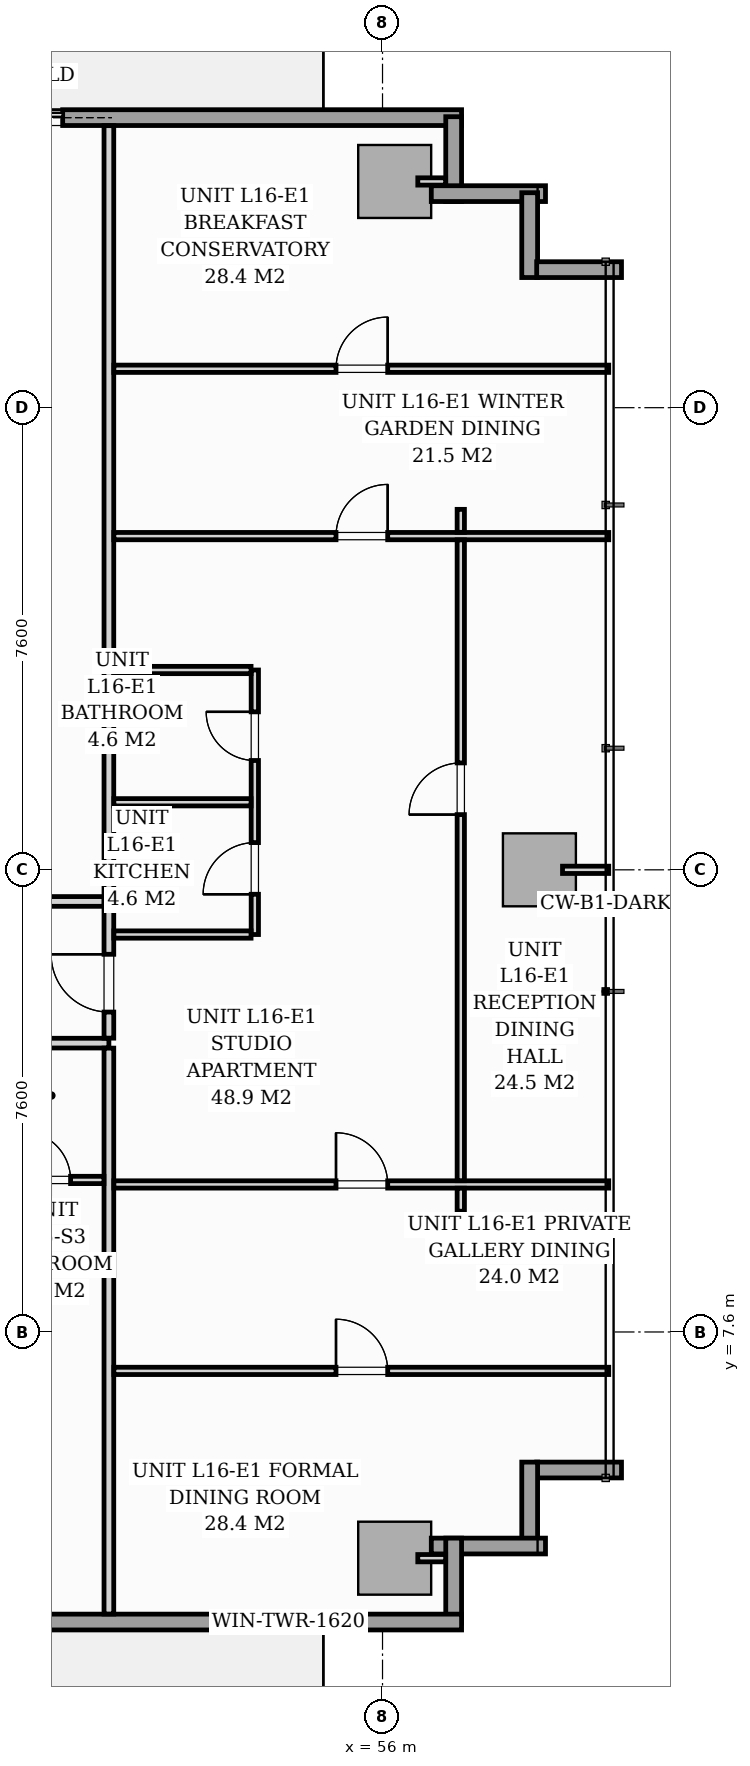
"""IFC4 building model, lengths in metres.
Left out: names, types, materials, properties, quantities, classifications, styles, units other than length and angle.
Written with IfcOpenShell. Run it as: python <this file> out.ifc"""

import sys

from ifc_helpers import new_model, si_unit, direction, frame, frame_2d, origin, origin_2d, place, context, subcontext, project, spatial, rectangle, extrude, source, transform, mapped, element, fill, save


model = new_model("IFC4")
c1 = context("Model", 3, precision=1e-05, world=origin(), true_north=direction((0.0, 1.0)))
c2 = subcontext(c1, "Body", "Model", "MODEL_VIEW")
j1 = project(units=[si_unit("LENGTHUNIT", "METRE"), si_unit("PLANEANGLEUNIT", "RADIAN")], contexts=[c1])
p1 = place(None, origin())
s1 = spatial("IfcSite", under=j1, at=p1, CompositionType="ELEMENT")
p2 = place(p1, origin())
s2 = spatial("IfcBuilding", under=s1, at=p2, CompositionType="ELEMENT")
p3 = place(p2, frame((0.0, 0.0, 58.2)))
s3 = spatial("IfcBuildingStorey", under=s2, at=p3, CompositionType="ELEMENT", Elevation=58.2)
m1 = source(origin(), c2, "Body", "SweptSolid", [
    extrude(rectangle(XDim=1.2, YDim=1.2, at=origin_2d()), origin(), (0.0, 0.0, 1.0), 3.196),
])
for number, where, z_axis, x_axis in (
    (1, (56.2, 3.88, 0.002), (0.0, 0.0, 1.0), (1.0, 0.0, 0.0)),
    (2, (56.2, 26.52, 0.002), (0.0, 0.0, 1.0), (1.0, 0.0, 0.0)),
    (3, (58.58, 15.2, 0.002), (0.0, 0.0, 1.0), (1.0, 0.0, 0.0)),
):
    element("IfcColumn", number, at=place(p3, frame(where, z_axis=z_axis, x_axis=x_axis)), inside=s3, PredefinedType="COLUMN", context=c2, shape_type="MappedRepresentation", body=[
        mapped(m1, transform((0.0, 0.0, 0.0), scale=1.0)),
    ])
p4 = place(p3, frame((40.15, 27.57, 0.0), z_axis=(0.0, 0.0, 1.0), x_axis=(1.0, 0.0, 0.0)))
e4 = element("IfcWall", 4, at=p4, inside=s3, PredefinedType="STANDARD", context=c2, shape_type="SweptSolid", body=[
    extrude(rectangle(XDim=17.15, YDim=0.26, at=frame_2d((8.575, 0.0))), origin(), (0.0, 0.0, 1.0), 2.94),
])
p5 = place(p4, frame((8.79, 0.0, 0.0)))
e5 = element("IfcOpeningElement", 5, at=p5, cuts=e4, PredefinedType="OPENING", context=c2, shape_type="SweptSolid", body=[
    extrude(rectangle(XDim=1.8, YDim=2.06, at=frame_2d((0.9, 1.03))), frame((0.0, 0.14, 0.0), z_axis=(0.0, -1.0, 0.0), x_axis=(1.0, 0.0, 0.0)), (0.0, 0.0, 1.0), 0.28),
])
p6 = place(p4, frame((0.7, 0.0, 0.65)))
e6 = element("IfcOpeningElement", 6, at=p6, cuts=e4, PredefinedType="OPENING", context=c2, shape_type="SweptSolid", body=[
    extrude(rectangle(XDim=1.6, YDim=1.5, at=frame_2d((0.8, 0.75))), frame((0.0, 0.14, 0.0), z_axis=(0.0, -1.0, 0.0), x_axis=(1.0, 0.0, 0.0)), (0.0, 0.0, 1.0), 0.28),
])
p7 = place(p3, frame((57.17, 27.585, 0.0), z_axis=(0.0, 0.0, 1.0), x_axis=(0.0, -1.0, 0.0)))
e7 = element("IfcWall", 7, at=p7, inside=s3, PredefinedType="STANDARD", context=c2, shape_type="SweptSolid", body=[
    extrude(rectangle(XDim=1.395, YDim=0.26, at=frame_2d((0.698, 0.0))), origin(), (0.0, 0.0, 1.0), 2.94),
])
p8 = place(p3, frame((56.802, 26.32, 0.0), z_axis=(0.0, 0.0, 1.0), x_axis=(1.0, 0.0, 0.0)))
e8 = element("IfcWall", 8, at=p8, inside=s3, PredefinedType="STANDARD", context=c2, shape_type="SweptSolid", body=[
    extrude(rectangle(XDim=1.878, YDim=0.26, at=frame_2d((0.939, 0.0))), origin(), (0.0, 0.0, 1.0), 2.94),
])
for number, where, z_axis, x_axis in (
    (9, (58.42, 26.335, 0.0), (0.0, 0.0, 1.0), (0.0, -1.0, 0.0)),
    (10, (58.535, 25.07, 0.0), (0.0, 0.0, 1.0), (1.0, 0.0, 0.0)),
    (11, (59.93, 5.33, 0.0), (0.0, 0.0, 1.0), (-1.0, 0.0, 0.0)),
    (12, (58.42, 5.46, 0.0), (0.0, 0.0, 1.0), (0.0, -1.0, 0.0)),
):
    element("IfcWall", number, at=place(p3, frame(where, z_axis=z_axis, x_axis=x_axis)), inside=s3, PredefinedType="STANDARD", context=c2, shape_type="SweptSolid", body=[
        extrude(rectangle(XDim=1.395, YDim=0.26, at=frame_2d((0.698, 0.0))), origin(), (0.0, 0.0, 1.0), 2.94),
    ])
p9 = place(p3, frame((58.68, 4.08, 0.0), z_axis=(0.0, 0.0, 1.0), x_axis=(-1.0, 0.0, 0.0)))
e13 = element("IfcWall", 13, at=p9, inside=s3, PredefinedType="STANDARD", context=c2, shape_type="SweptSolid", body=[
    extrude(rectangle(XDim=1.878, YDim=0.26, at=frame_2d((0.939, 0.0))), origin(), (0.0, 0.0, 1.0), 2.94),
])
p10 = place(p3, frame((57.17, 4.21, 0.0), z_axis=(0.0, 0.0, 1.0), x_axis=(0.0, -1.0, 0.0)))
e14 = element("IfcWall", 14, at=p10, inside=s3, PredefinedType="STANDARD", context=c2, shape_type="SweptSolid", body=[
    extrude(rectangle(XDim=1.395, YDim=0.26, at=frame_2d((0.698, 0.0))), origin(), (0.0, 0.0, 1.0), 2.94),
])
p11 = place(p3, frame((57.3, 2.83, 0.0), z_axis=(0.0, 0.0, 1.0), x_axis=(-1.0, 0.0, 0.0)))
e15 = element("IfcWall", 15, at=p11, inside=s3, PredefinedType="STANDARD", context=c2, shape_type="SweptSolid", body=[
    extrude(rectangle(XDim=17.15, YDim=0.26, at=frame_2d((8.575, 0.0))), origin(), (0.0, 0.0, 1.0), 2.94),
])
p12 = place(p11, frame((8.633, 0.0, 0.0)))
e16 = element("IfcOpeningElement", 16, at=p12, cuts=e15, PredefinedType="OPENING", context=c2, shape_type="SweptSolid", body=[
    extrude(rectangle(XDim=1.8, YDim=2.06, at=frame_2d((0.9, 1.03))), frame((0.0, 0.14, 0.0), z_axis=(0.0, -1.0, 0.0), x_axis=(1.0, 0.0, 0.0)), (0.0, 0.0, 1.0), 0.28),
])
p13 = place(p11, frame((2.05, 0.0, 0.65)))
e17 = element("IfcOpeningElement", 17, at=p13, cuts=e15, PredefinedType="OPENING", context=c2, shape_type="SweptSolid", body=[
    extrude(rectangle(XDim=1.6, YDim=1.5, at=frame_2d((0.8, 0.75))), frame((0.0, 0.14, 0.0), z_axis=(0.0, -1.0, 0.0), x_axis=(1.0, 0.0, 0.0)), (0.0, 0.0, 1.0), 0.28),
])
p14 = place(p3, frame((16.3, 12.35, 0.0), z_axis=(0.0, 0.0, 1.0), x_axis=(1.0, 0.0, 0.0)))
e18 = element("IfcWall", 18, at=p14, inside=s3, PredefinedType="PARTITIONING", context=c2, shape_type="SweptSolid", body=[
    extrude(rectangle(XDim=35.2, YDim=0.16, at=frame_2d((17.6, 0.0))), origin(), (0.0, 0.0, 1.0), 2.94),
])
p15 = place(p14, frame((6.307, 0.0, 0.0)))
e19 = element("IfcOpeningElement", 19, at=p15, cuts=e18, PredefinedType="OPENING", context=c2, shape_type="SweptSolid", body=[
    extrude(rectangle(XDim=0.95, YDim=2.06, at=frame_2d((0.475, 1.03))), frame((0.0, 0.09, 0.0), z_axis=(0.0, -1.0, 0.0), x_axis=(1.0, 0.0, 0.0)), (0.0, 0.0, 1.0), 0.18),
])
p16 = place(p14, frame((18.392, 0.0, 0.0)))
e20 = element("IfcOpeningElement", 20, at=p16, cuts=e18, PredefinedType="OPENING", context=c2, shape_type="SweptSolid", body=[
    extrude(rectangle(XDim=0.95, YDim=2.06, at=frame_2d((0.475, 1.03))), frame((0.0, 0.09, 0.0), z_axis=(0.0, -1.0, 0.0), x_axis=(1.0, 0.0, 0.0)), (0.0, 0.0, 1.0), 0.18),
])
p17 = place(p14, frame((29.304, 0.0, 0.0)))
e21 = element("IfcOpeningElement", 21, at=p17, cuts=e18, PredefinedType="OPENING", context=c2, shape_type="SweptSolid", body=[
    extrude(rectangle(XDim=0.95, YDim=2.06, at=frame_2d((0.475, 1.03))), frame((0.0, 0.09, 0.0), z_axis=(0.0, -1.0, 0.0), x_axis=(1.0, 0.0, 0.0)), (0.0, 0.0, 1.0), 0.18),
])
p18 = place(p3, frame((51.5, 2.962, 0.0), z_axis=(0.0, 0.0, 1.0), x_axis=(0.0, 1.0, 0.0)))
e22 = element("IfcWall", 22, at=p18, inside=s3, PredefinedType="PARTITIONING", context=c2, shape_type="SweptSolid", body=[
    extrude(rectangle(XDim=9.306, YDim=0.16, at=frame_2d((4.653, 0.0))), origin(), (0.0, 0.0, 1.0), 2.94),
])
p19 = place(p3, frame((51.5, 12.432, 0.0), z_axis=(0.0, 0.0, 1.0), x_axis=(0.0, 1.0, 0.0)))
e23 = element("IfcWall", 23, at=p19, inside=s3, PredefinedType="PARTITIONING", context=c2, shape_type="SweptSolid", body=[
    extrude(rectangle(XDim=15.006, YDim=0.16, at=frame_2d((7.503, 0.0))), origin(), (0.0, 0.0, 1.0), 2.94),
])
p20 = place(p19, frame((0.429, 0.0, 0.0)))
e24 = element("IfcOpeningElement", 24, at=p20, cuts=e23, PredefinedType="OPENING", context=c2, shape_type="SweptSolid", body=[
    extrude(rectangle(XDim=0.95, YDim=2.06, at=frame_2d((0.475, 1.03))), frame((0.0, 0.09, 0.0), z_axis=(0.0, -1.0, 0.0), x_axis=(1.0, 0.0, 0.0)), (0.0, 0.0, 1.0), 0.18),
])
p21 = place(p3, frame((47.32, 10.1, 0.0), z_axis=(0.0, 0.0, 1.0), x_axis=(1.0, 0.0, 0.0)))
e25 = element("IfcWall", 25, at=p21, inside=s3, PredefinedType="PARTITIONING", context=c2, shape_type="SweptSolid", body=[
    extrude(rectangle(XDim=4.098, YDim=0.12, at=frame_2d((2.049, 0.0))), origin(), (0.0, 0.0, 1.0), 2.94),
])
p22 = place(p21, frame((0.675, 0.0, 0.0)))
e26 = element("IfcOpeningElement", 26, at=p22, cuts=e25, PredefinedType="OPENING", context=c2, shape_type="SweptSolid", body=[
    extrude(rectangle(XDim=0.85, YDim=2.05, at=frame_2d((0.425, 1.025))), frame((0.0, 0.07, 0.0), z_axis=(0.0, -1.0, 0.0), x_axis=(1.0, 0.0, 0.0)), (0.0, 0.0, 1.0), 0.14),
])
p23 = place(p21, frame((2.75, 0.0, 0.0)))
e27 = element("IfcOpeningElement", 27, at=p23, cuts=e25, PredefinedType="OPENING", context=c2, shape_type="SweptSolid", body=[
    extrude(rectangle(XDim=0.8, YDim=2.02, at=frame_2d((0.4, 1.01))), frame((0.0, 0.07, 0.0), z_axis=(0.0, -1.0, 0.0), x_axis=(1.0, 0.0, 0.0)), (0.0, 0.0, 1.0), 0.14),
])
p24 = place(p3, frame((53.9, 14.136, 0.0), z_axis=(0.0, 0.0, 1.0), x_axis=(0.0, 1.0, 0.0)))
e28 = element("IfcWall", 28, at=p24, inside=s3, PredefinedType="PARTITIONING", context=c2, shape_type="SweptSolid", body=[
    extrude(rectangle(XDim=4.35, YDim=0.12, at=frame_2d((2.175, 0.0))), origin(), (0.0, 0.0, 1.0), 2.94),
])
p25 = place(p24, frame((0.662, 0.0, 0.0)))
e29 = element("IfcOpeningElement", 29, at=p25, cuts=e28, PredefinedType="OPENING", context=c2, shape_type="SweptSolid", body=[
    extrude(rectangle(XDim=0.85, YDim=2.05, at=frame_2d((0.425, 1.025))), frame((0.0, 0.07, 0.0), z_axis=(0.0, -1.0, 0.0), x_axis=(1.0, 0.0, 0.0)), (0.0, 0.0, 1.0), 0.14),
])
p26 = place(p24, frame((2.862, 0.0, 0.0)))
e30 = element("IfcOpeningElement", 30, at=p26, cuts=e28, PredefinedType="OPENING", context=c2, shape_type="SweptSolid", body=[
    extrude(rectangle(XDim=0.8, YDim=2.02, at=frame_2d((0.4, 1.01))), frame((0.0, 0.07, 0.0), z_axis=(0.0, -1.0, 0.0), x_axis=(1.0, 0.0, 0.0)), (0.0, 0.0, 1.0), 0.14),
])
p27 = place(p3, frame((51.582, 16.311, 0.0), z_axis=(0.0, 0.0, 1.0), x_axis=(1.0, 0.0, 0.0)))
e31 = element("IfcWall", 31, at=p27, inside=s3, PredefinedType="PARTITIONING", context=c2, shape_type="SweptSolid", body=[
    extrude(rectangle(XDim=2.256, YDim=0.12, at=frame_2d((1.128, 0.0))), origin(), (0.0, 0.0, 1.0), 2.045),
])
for number, where, z_axis, x_axis in (
    (32, (51.582, 14.136, 0.0), (0.0, 0.0, 1.0), (1.0, 0.0, 0.0)),
    (33, (51.582, 18.486, 0.0), (0.0, 0.0, 1.0), (1.0, 0.0, 0.0)),
):
    element("IfcWall", number, at=place(p3, frame(where, z_axis=z_axis, x_axis=x_axis)), inside=s3, PredefinedType="PARTITIONING", context=c2, shape_type="SweptSolid", body=[
        extrude(rectangle(XDim=2.256, YDim=0.12, at=frame_2d((1.128, 0.0))), origin(), (0.0, 0.0, 1.0), 2.94),
    ])
p28 = place(p3, frame((51.582, 6.96, 0.0), z_axis=(0.0, 0.0, 1.0), x_axis=(1.0, 0.0, 0.0)))
e34 = element("IfcWall", 34, at=p28, inside=s3, PredefinedType="PARTITIONING", context=c2, shape_type="SweptSolid", body=[
    extrude(rectangle(XDim=8.138, YDim=0.12, at=frame_2d((4.069, 0.0))), origin(), (0.0, 0.0, 1.0), 2.94),
])
p29 = place(p28, frame((3.653, 0.0, 0.0)))
e35 = element("IfcOpeningElement", 35, at=p29, cuts=e34, PredefinedType="OPENING", context=c2, shape_type="SweptSolid", body=[
    extrude(rectangle(XDim=0.85, YDim=2.05, at=frame_2d((0.425, 1.025))), frame((0.0, 0.07, 0.0), z_axis=(0.0, -1.0, 0.0), x_axis=(1.0, 0.0, 0.0)), (0.0, 0.0, 1.0), 0.14),
])
p30 = place(p3, frame((51.582, 23.44, 0.0), z_axis=(0.0, 0.0, 1.0), x_axis=(1.0, 0.0, 0.0)))
e36 = element("IfcWall", 36, at=p30, inside=s3, PredefinedType="PARTITIONING", context=c2, shape_type="SweptSolid", body=[
    extrude(rectangle(XDim=8.138, YDim=0.12, at=frame_2d((4.069, 0.0))), origin(), (0.0, 0.0, 1.0), 2.94),
])
p31 = place(p30, frame((3.653, 0.0, 0.0)))
e37 = element("IfcOpeningElement", 37, at=p31, cuts=e36, PredefinedType="OPENING", context=c2, shape_type="SweptSolid", body=[
    extrude(rectangle(XDim=0.85, YDim=2.05, at=frame_2d((0.425, 1.025))), frame((0.0, 0.07, 0.0), z_axis=(0.0, -1.0, 0.0), x_axis=(1.0, 0.0, 0.0)), (0.0, 0.0, 1.0), 0.14),
])
p32 = place(p3, frame((51.582, 10.026, 0.0), z_axis=(0.0, 0.0, 1.0), x_axis=(1.0, 0.0, 0.0)))
e38 = element("IfcWall", 38, at=p32, inside=s3, PredefinedType="PARTITIONING", context=c2, shape_type="SweptSolid", body=[
    extrude(rectangle(XDim=8.138, YDim=0.12, at=frame_2d((4.069, 0.0))), origin(), (0.0, 0.0, 1.0), 2.94),
])
p33 = place(p32, frame((3.653, 0.0, 0.0)))
e39 = element("IfcOpeningElement", 39, at=p33, cuts=e38, PredefinedType="OPENING", context=c2, shape_type="SweptSolid", body=[
    extrude(rectangle(XDim=0.85, YDim=2.05, at=frame_2d((0.425, 1.025))), frame((0.0, 0.07, 0.0), z_axis=(0.0, -1.0, 0.0), x_axis=(1.0, 0.0, 0.0)), (0.0, 0.0, 1.0), 0.14),
])
p34 = place(p3, frame((51.582, 20.688, 0.0), z_axis=(0.0, 0.0, 1.0), x_axis=(1.0, 0.0, 0.0)))
e40 = element("IfcWall", 40, at=p34, inside=s3, PredefinedType="PARTITIONING", context=c2, shape_type="SweptSolid", body=[
    extrude(rectangle(XDim=8.138, YDim=0.12, at=frame_2d((4.069, 0.0))), origin(), (0.0, 0.0, 1.0), 2.94),
])
p35 = place(p34, frame((3.653, 0.0, 0.0)))
e41 = element("IfcOpeningElement", 41, at=p35, cuts=e40, PredefinedType="OPENING", context=c2, shape_type="SweptSolid", body=[
    extrude(rectangle(XDim=0.85, YDim=2.05, at=frame_2d((0.425, 1.025))), frame((0.0, 0.07, 0.0), z_axis=(0.0, -1.0, 0.0), x_axis=(1.0, 0.0, 0.0)), (0.0, 0.0, 1.0), 0.14),
])
p36 = place(p3, frame((57.287, 9.586, 0.0), z_axis=(0.0, 0.0, 1.0), x_axis=(0.0, 1.0, 0.0)))
e42 = element("IfcWall", 42, at=p36, inside=s3, PredefinedType="PARTITIONING", context=c2, shape_type="SweptSolid", body=[
    extrude(rectangle(XDim=0.378, YDim=0.12, at=frame_2d((0.189, 0.0))), origin(), (0.0, 0.0, 1.0), 2.94),
])
p37 = place(p3, frame((57.287, 10.088, 0.0), z_axis=(0.0, 0.0, 1.0), x_axis=(0.0, 1.0, 0.0)))
e43 = element("IfcWall", 43, at=p37, inside=s3, PredefinedType="PARTITIONING", context=c2, shape_type="SweptSolid", body=[
    extrude(rectangle(XDim=10.538, YDim=0.12, at=frame_2d((5.269, 0.0))), origin(), (0.0, 0.0, 1.0), 2.94),
])
p38 = place(p37, frame((6.02, 0.0, 0.0)))
e44 = element("IfcOpeningElement", 44, at=p38, cuts=e43, PredefinedType="OPENING", context=c2, shape_type="SweptSolid", body=[
    extrude(rectangle(XDim=0.85, YDim=2.05, at=frame_2d((0.425, 1.025))), frame((0.0, 0.07, 0.0), z_axis=(0.0, -1.0, 0.0), x_axis=(1.0, 0.0, 0.0)), (0.0, 0.0, 1.0), 0.14),
])
p39 = place(p3, frame((57.287, 20.75, 0.0), z_axis=(0.0, 0.0, 1.0), x_axis=(0.0, 1.0, 0.0)))
e45 = element("IfcWall", 45, at=p39, inside=s3, PredefinedType="PARTITIONING", context=c2, shape_type="SweptSolid", body=[
    extrude(rectangle(XDim=0.378, YDim=0.12, at=frame_2d((0.189, 0.0))), origin(), (0.0, 0.0, 1.0), 2.31),
])
p40 = place(p3, frame((45.84, 14.68, 0.0), z_axis=(0.0, 0.0, 1.0), x_axis=(1.0, 0.0, 0.0)))
e46 = element("IfcWall", 46, at=p40, inside=s3, PredefinedType="PARTITIONING", context=c2, shape_type="SweptSolid", body=[
    extrude(rectangle(XDim=5.578, YDim=0.16, at=frame_2d((2.789, 0.0))), origin(), (0.0, 0.0, 1.0), 2.94),
])
p41 = place(p40, frame((2.415, 0.0, 0.0)))
e47 = element("IfcOpeningElement", 47, at=p41, cuts=e46, PredefinedType="OPENING", context=c2, shape_type="SweptSolid", body=[
    extrude(rectangle(XDim=0.95, YDim=2.06, at=frame_2d((0.475, 1.03))), frame((0.0, 0.09, 0.0), z_axis=(0.0, -1.0, 0.0), x_axis=(1.0, 0.0, 0.0)), (0.0, 0.0, 1.0), 0.18),
])
for number, where, z_axis, x_axis in (
    (48, (56.58, 3.88, 0.0), (0.0, 0.0, 1.0), (1.0, 0.0, 0.0)),
    (49, (56.58, 26.52, 0.0), (0.0, 0.0, 1.0), (1.0, 0.0, 0.0)),
):
    element("IfcWall", number, at=place(p3, frame(where, z_axis=z_axis, x_axis=x_axis)), inside=s3, PredefinedType="PARTITIONING", context=c2, shape_type="SweptSolid", body=[
        extrude(rectangle(XDim=0.458, YDim=0.12, at=frame_2d((0.229, 0.0))), origin(), (0.0, 0.0, 1.0), 2.94),
    ])
p42 = place(p3, frame((58.96, 15.2, 0.0), z_axis=(0.0, 0.0, 1.0), x_axis=(1.0, 0.0, 0.0)))
e50 = element("IfcWall", 50, at=p42, inside=s3, PredefinedType="PARTITIONING", context=c2, shape_type="SweptSolid", body=[
    extrude(rectangle(XDim=0.76, YDim=0.12, at=frame_2d((0.38, 0.0))), origin(), (0.0, 0.0, 1.0), 2.94),
])
m2 = source(origin(), c2, "Body", "SweptSolid", [
    extrude(rectangle(XDim=1.8, YDim=2.06, at=frame_2d((0.9, 1.03))), frame((0.0, 0.025, 0.0), z_axis=(0.0, -1.0, 0.0), x_axis=(1.0, 0.0, 0.0)), (0.0, 0.0, 1.0), 0.05),
])
p43 = place(p5, origin())
e51 = element("IfcDoor", 51, at=p43, inside=s3, OperationType="SLIDING_TO_RIGHT", PredefinedType="DOOR", context=c2, shape_type="MappedRepresentation", body=[
    mapped(m2, transform((0.0, 0.0, 0.0), scale=1.0)),
])
fill(e5, e51)
m3 = source(origin(), c2, "Body", "SweptSolid", [
    extrude(rectangle(XDim=1.6, YDim=1.5, at=frame_2d((0.8, 0.75))), frame((0.0, 0.03, 0.0), z_axis=(0.0, -1.0, 0.0), x_axis=(1.0, 0.0, 0.0)), (0.0, 0.0, 1.0), 0.06),
])
p44 = place(p13, origin())
e52 = element("IfcWindow", 52, at=p44, inside=s3, PartitioningType="SINGLE_PANEL", PredefinedType="WINDOW", context=c2, shape_type="MappedRepresentation", body=[
    mapped(m3, transform((0.0, 0.0, 0.0), scale=1.0)),
])
fill(e17, e52)
m4 = source(origin(), c2, "Body", "SweptSolid", [
    extrude(rectangle(XDim=0.8, YDim=2.02, at=frame_2d((0.4, 1.01))), frame((0.0, 0.025, 0.0), z_axis=(0.0, -1.0, 0.0), x_axis=(1.0, 0.0, 0.0)), (0.0, 0.0, 1.0), 0.05),
])
p45 = place(p23, origin())
e53 = element("IfcDoor", 53, at=p45, inside=s3, OperationType="SINGLE_SWING_LEFT", PredefinedType="DOOR", context=c2, shape_type="MappedRepresentation", body=[
    mapped(m4, transform((0.0, 0.0, 0.0), scale=1.0)),
])
fill(e27, e53)
m5 = source(origin(), c2, "Body", "SweptSolid", [
    extrude(rectangle(XDim=0.95, YDim=2.06, at=frame_2d((0.475, 1.03))), frame((0.0, 0.025, 0.0), z_axis=(0.0, -1.0, 0.0), x_axis=(1.0, 0.0, 0.0)), (0.0, 0.0, 1.0), 0.05),
])
p46 = place(p20, origin())
e54 = element("IfcDoor", 54, at=p46, inside=s3, OperationType="SINGLE_SWING_RIGHT", PredefinedType="DOOR", context=c2, shape_type="MappedRepresentation", body=[
    mapped(m5, transform((0.0, 0.0, 0.0), scale=1.0)),
])
fill(e24, e54)
m6 = source(origin(), c2, "Body", "SweptSolid", [
    extrude(rectangle(XDim=0.85, YDim=2.05, at=frame_2d((0.425, 1.025))), frame((0.0, 0.025, 0.0), z_axis=(0.0, -1.0, 0.0), x_axis=(1.0, 0.0, 0.0)), (0.0, 0.0, 1.0), 0.05),
])
p47 = place(p25, origin())
e55 = element("IfcDoor", 55, at=p47, inside=s3, OperationType="SINGLE_SWING_LEFT", PredefinedType="DOOR", context=c2, shape_type="MappedRepresentation", body=[
    mapped(m6, transform((0.0, 0.0, 0.0), scale=1.0)),
])
fill(e29, e55)
p48 = place(p26, origin())
e56 = element("IfcDoor", 56, at=p48, inside=s3, OperationType="SINGLE_SWING_RIGHT", PredefinedType="DOOR", context=c2, shape_type="MappedRepresentation", body=[
    mapped(m4, transform((0.0, 0.0, 0.0), scale=1.0)),
])
fill(e30, e56)
p49 = place(p29, origin())
e57 = element("IfcDoor", 57, at=p49, inside=s3, OperationType="SINGLE_SWING_LEFT", PredefinedType="DOOR", context=c2, shape_type="MappedRepresentation", body=[
    mapped(m6, transform((0.0, 0.0, 0.0), scale=1.0)),
])
fill(e35, e57)
p50 = place(p31, origin())
e58 = element("IfcDoor", 58, at=p50, inside=s3, OperationType="SINGLE_SWING_RIGHT", PredefinedType="DOOR", context=c2, shape_type="MappedRepresentation", body=[
    mapped(m6, transform((0.0, 0.0, 0.0), scale=1.0)),
])
fill(e37, e58)
p51 = place(p33, origin())
e59 = element("IfcDoor", 59, at=p51, inside=s3, OperationType="SINGLE_SWING_LEFT", PredefinedType="DOOR", context=c2, shape_type="MappedRepresentation", body=[
    mapped(m6, transform((0.0, 0.0, 0.0), scale=1.0)),
])
fill(e39, e59)
p52 = place(p35, origin())
e60 = element("IfcDoor", 60, at=p52, inside=s3, OperationType="SINGLE_SWING_RIGHT", PredefinedType="DOOR", context=c2, shape_type="MappedRepresentation", body=[
    mapped(m6, transform((0.0, 0.0, 0.0), scale=1.0)),
])
fill(e41, e60)
p53 = place(p38, origin())
e61 = element("IfcDoor", 61, at=p53, inside=s3, OperationType="SINGLE_SWING_LEFT", PredefinedType="DOOR", context=c2, shape_type="MappedRepresentation", body=[
    mapped(m6, transform((0.0, 0.0, 0.0), scale=1.0)),
])
fill(e44, e61)
save(model, sys.argv[1])
